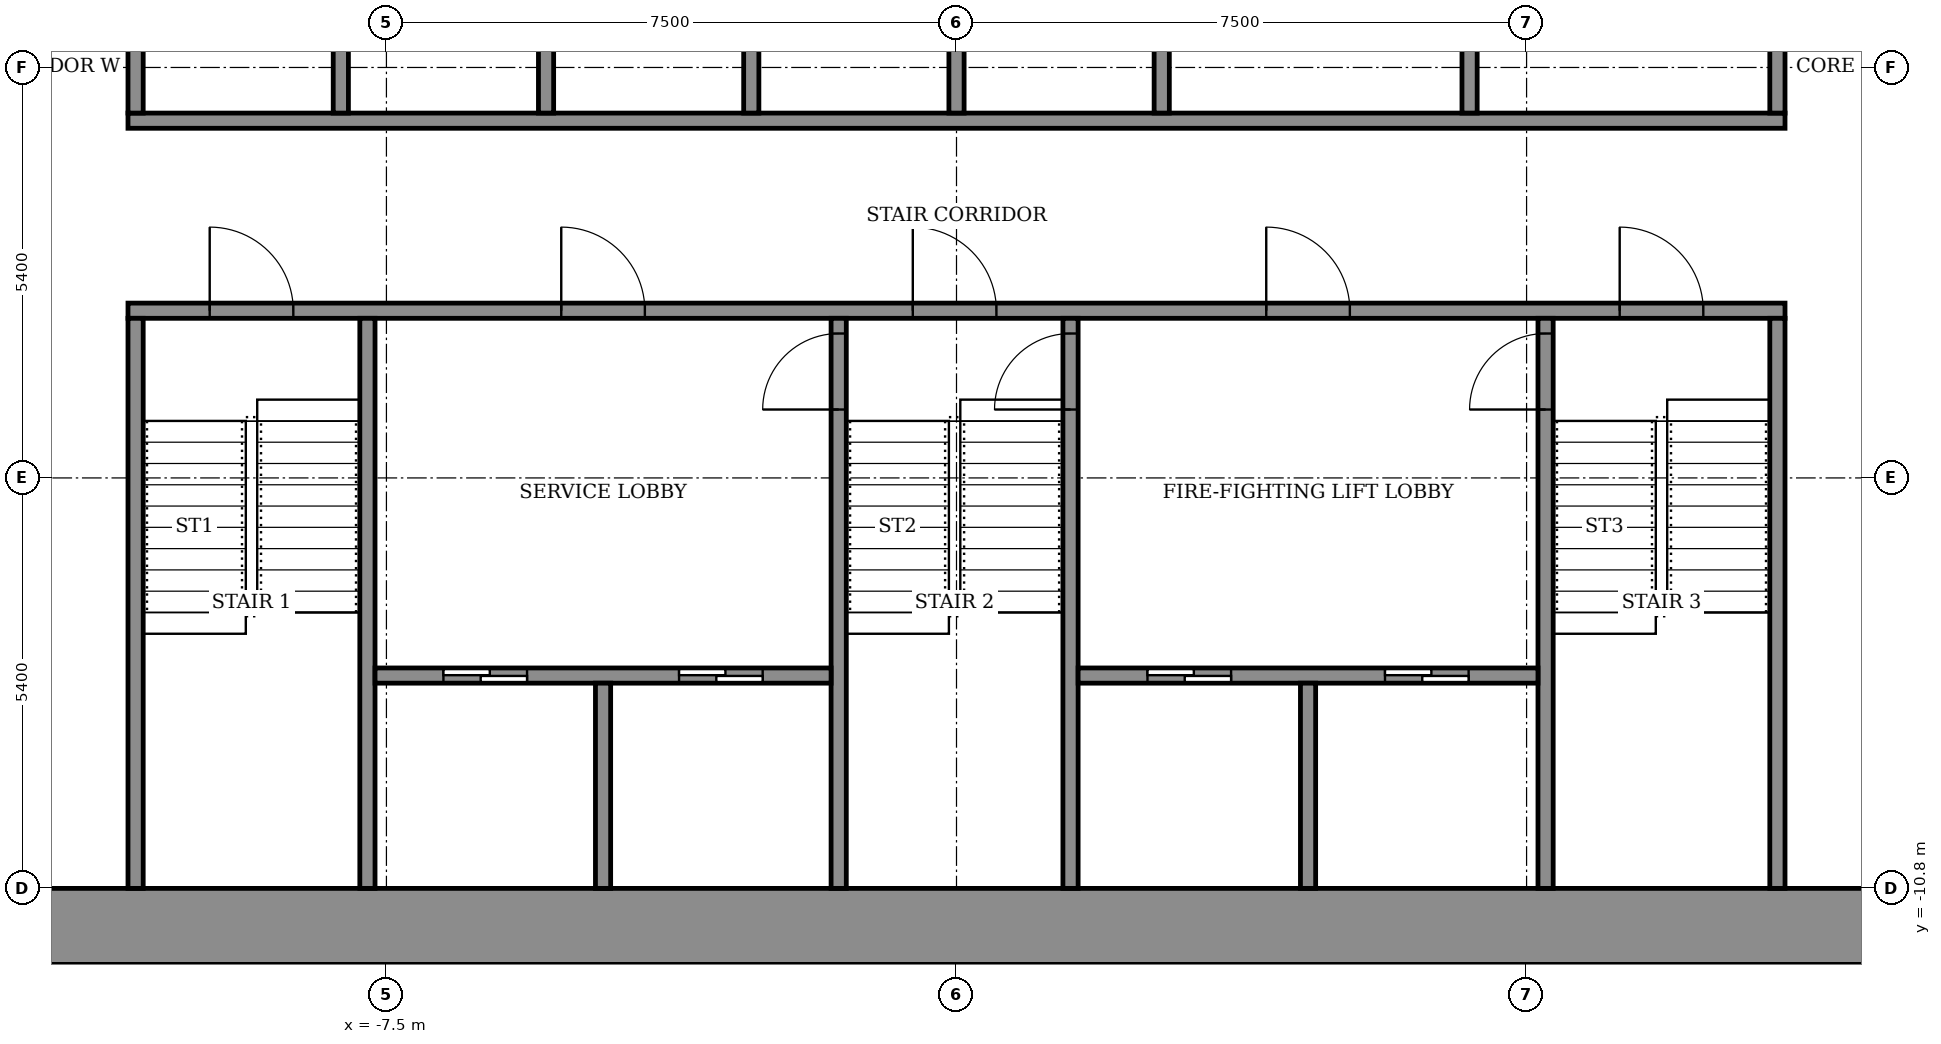
"""IFC4 building model, lengths in metres.
Left out: names, types, materials, properties, quantities, classifications, styles, units other than length and angle.
Written with IfcOpenShell. Run it as: python <this file> out.ifc"""

import sys

from ifc_helpers import new_model, si_unit, direction, frame, frame_2d, origin, place, context, subcontext, project, spatial, rectangle, extrude, element, fill, save


model = new_model("IFC4")
c1 = context("Model", 3, precision=1e-05, world=origin(), true_north=direction((0.0, 1.0)))
c2 = subcontext(c1, "Body", "Model", "MODEL_VIEW")
j1 = project(units=[si_unit("LENGTHUNIT", "METRE"), si_unit("PLANEANGLEUNIT", "RADIAN")], contexts=[c1])
p1 = place(None, origin())
s1 = spatial("IfcSite", under=j1, at=p1, CompositionType="ELEMENT")
p2 = place(p1, origin())
s2 = spatial("IfcBuilding", under=s1, at=p2, CompositionType="ELEMENT")
p3 = place(p2, frame((0.0, 0.0, 90.1)))
s3 = spatial("IfcBuildingStorey", under=s2, at=p3, CompositionType="ELEMENT", Elevation=90.1)
p4 = place(p3, frame((-14.8, -11.3, 0.0), z_axis=(0.0, 0.0, 1.0), x_axis=(1.0, 0.0, 0.0)))
e1 = element("IfcWall", 1, at=p4, inside=s3, PredefinedType="SHEAR", context=c2, shape_type="SweptSolid", body=[
    extrude(rectangle(XDim=29.6, YDim=1.0, at=frame_2d((14.8, 0.0))), origin(), (0.0, 0.0, 1.0), 3.6),
])
p5 = place(p3, frame((-10.9, -3.2, 0.0), z_axis=(0.0, 0.0, 1.0), x_axis=(1.0, 0.0, 0.0)))
e2 = element("IfcWall", 2, at=p5, inside=s3, PredefinedType="SHEAR", context=c2, shape_type="SweptSolid", body=[
    extrude(rectangle(XDim=21.8, YDim=0.2, at=frame_2d((10.9, 0.0))), origin(), (0.0, 0.0, 1.0), 3.05),
])
p6 = place(p5, frame((1.075, 0.0, 0.0)))
e3 = element("IfcOpeningElement", 3, at=p6, cuts=e2, PredefinedType="OPENING", context=c2, shape_type="SweptSolid", body=[
    extrude(rectangle(XDim=1.1, YDim=2.1, at=frame_2d((0.55, 1.05))), frame((0.0, 0.11, 0.0), z_axis=(0.0, -1.0, 0.0), x_axis=(1.0, 0.0, 0.0)), (0.0, 0.0, 1.0), 0.22),
])
p7 = place(p5, frame((10.325, 0.0, 0.0)))
e4 = element("IfcOpeningElement", 4, at=p7, cuts=e2, PredefinedType="OPENING", context=c2, shape_type="SweptSolid", body=[
    extrude(rectangle(XDim=1.1, YDim=2.1, at=frame_2d((0.55, 1.05))), frame((0.0, 0.11, 0.0), z_axis=(0.0, -1.0, 0.0), x_axis=(1.0, 0.0, 0.0)), (0.0, 0.0, 1.0), 0.22),
])
p8 = place(p5, frame((19.625, 0.0, 0.0)))
e5 = element("IfcOpeningElement", 5, at=p8, cuts=e2, PredefinedType="OPENING", context=c2, shape_type="SweptSolid", body=[
    extrude(rectangle(XDim=1.1, YDim=2.1, at=frame_2d((0.55, 1.05))), frame((0.0, 0.11, 0.0), z_axis=(0.0, -1.0, 0.0), x_axis=(1.0, 0.0, 0.0)), (0.0, 0.0, 1.0), 0.22),
])
p9 = place(p5, frame((5.7, 0.0, 0.0)))
e6 = element("IfcOpeningElement", 6, at=p9, cuts=e2, PredefinedType="OPENING", context=c2, shape_type="SweptSolid", body=[
    extrude(rectangle(XDim=1.1, YDim=2.1, at=frame_2d((0.55, 1.05))), frame((0.0, 0.11, 0.0), z_axis=(0.0, -1.0, 0.0), x_axis=(1.0, 0.0, 0.0)), (0.0, 0.0, 1.0), 0.22),
])
p10 = place(p5, frame((14.975, 0.0, 0.0)))
e7 = element("IfcOpeningElement", 7, at=p10, cuts=e2, PredefinedType="OPENING", context=c2, shape_type="SweptSolid", body=[
    extrude(rectangle(XDim=1.1, YDim=2.1, at=frame_2d((0.55, 1.05))), frame((0.0, 0.11, 0.0), z_axis=(0.0, -1.0, 0.0), x_axis=(1.0, 0.0, 0.0)), (0.0, 0.0, 1.0), 0.22),
])
p11 = place(p3, frame((-10.9, -0.7, 0.0), z_axis=(0.0, 0.0, 1.0), x_axis=(1.0, 0.0, 0.0)))
e8 = element("IfcWall", 8, at=p11, inside=s3, PredefinedType="SHEAR", context=c2, shape_type="SweptSolid", body=[
    extrude(rectangle(XDim=21.8, YDim=0.2, at=frame_2d((10.9, 0.0))), origin(), (0.0, 0.0, 1.0), 3.05),
])
for number, where, z_axis, x_axis in (
    (9, (-10.8, -10.8, 0.0), (0.0, 0.0, 1.0), (0.0, 1.0, 0.0)),
    (10, (-7.75, -10.8, 0.0), (0.0, 0.0, 1.0), (0.0, 1.0, 0.0)),
):
    element("IfcWall", number, at=place(p3, frame(where, z_axis=z_axis, x_axis=x_axis)), inside=s3, PredefinedType="SHEAR", context=c2, shape_type="SweptSolid", body=[
        extrude(rectangle(XDim=7.5, YDim=0.2, at=frame_2d((3.75, 0.0))), origin(), (0.0, 0.0, 1.0), 3.05),
    ])
p12 = place(p3, frame((-1.55, -10.8, 0.0), z_axis=(0.0, 0.0, 1.0), x_axis=(0.0, 1.0, 0.0)))
e11 = element("IfcWall", 11, at=p12, inside=s3, PredefinedType="SHEAR", context=c2, shape_type="SweptSolid", body=[
    extrude(rectangle(XDim=7.5, YDim=0.2, at=frame_2d((3.75, 0.0))), origin(), (0.0, 0.0, 1.0), 3.05),
])
p13 = place(p12, frame((6.3, 0.0, 0.0)))
e12 = element("IfcOpeningElement", 12, at=p13, cuts=e11, PredefinedType="OPENING", context=c2, shape_type="SweptSolid", body=[
    extrude(rectangle(XDim=1.0, YDim=2.1, at=frame_2d((0.5, 1.05))), frame((0.0, 0.11, 0.0), z_axis=(0.0, -1.0, 0.0), x_axis=(1.0, 0.0, 0.0)), (0.0, 0.0, 1.0), 0.22),
])
p14 = place(p3, frame((1.5, -10.8, 0.0), z_axis=(0.0, 0.0, 1.0), x_axis=(0.0, 1.0, 0.0)))
e13 = element("IfcWall", 13, at=p14, inside=s3, PredefinedType="SHEAR", context=c2, shape_type="SweptSolid", body=[
    extrude(rectangle(XDim=7.5, YDim=0.2, at=frame_2d((3.75, 0.0))), origin(), (0.0, 0.0, 1.0), 3.05),
])
p15 = place(p14, frame((6.3, 0.0, 0.0)))
e14 = element("IfcOpeningElement", 14, at=p15, cuts=e13, PredefinedType="OPENING", context=c2, shape_type="SweptSolid", body=[
    extrude(rectangle(XDim=1.0, YDim=2.1, at=frame_2d((0.5, 1.05))), frame((0.0, 0.11, 0.0), z_axis=(0.0, -1.0, 0.0), x_axis=(1.0, 0.0, 0.0)), (0.0, 0.0, 1.0), 0.22),
])
p16 = place(p3, frame((7.75, -10.8, 0.0), z_axis=(0.0, 0.0, 1.0), x_axis=(0.0, 1.0, 0.0)))
e15 = element("IfcWall", 15, at=p16, inside=s3, PredefinedType="SHEAR", context=c2, shape_type="SweptSolid", body=[
    extrude(rectangle(XDim=7.5, YDim=0.2, at=frame_2d((3.75, 0.0))), origin(), (0.0, 0.0, 1.0), 3.05),
])
p17 = place(p16, frame((6.3, 0.0, 0.0)))
e16 = element("IfcOpeningElement", 16, at=p17, cuts=e15, PredefinedType="OPENING", context=c2, shape_type="SweptSolid", body=[
    extrude(rectangle(XDim=1.0, YDim=2.1, at=frame_2d((0.5, 1.05))), frame((0.0, 0.11, 0.0), z_axis=(0.0, -1.0, 0.0), x_axis=(1.0, 0.0, 0.0)), (0.0, 0.0, 1.0), 0.22),
])
p18 = place(p3, frame((10.8, -10.8, 0.0), z_axis=(0.0, 0.0, 1.0), x_axis=(0.0, 1.0, 0.0)))
e17 = element("IfcWall", 17, at=p18, inside=s3, PredefinedType="SHEAR", context=c2, shape_type="SweptSolid", body=[
    extrude(rectangle(XDim=7.5, YDim=0.2, at=frame_2d((3.75, 0.0))), origin(), (0.0, 0.0, 1.0), 3.05),
])
p19 = place(p3, frame((-7.65, -8.0, 0.0), z_axis=(0.0, 0.0, 1.0), x_axis=(1.0, 0.0, 0.0)))
e18 = element("IfcWall", 18, at=p19, inside=s3, PredefinedType="SHEAR", context=c2, shape_type="SweptSolid", body=[
    extrude(rectangle(XDim=6.0, YDim=0.2, at=frame_2d((3.0, 0.0))), origin(), (0.0, 0.0, 1.0), 3.05),
])
p20 = place(p19, frame((0.9, 0.0, 0.0)))
e19 = element("IfcOpeningElement", 19, at=p20, cuts=e18, PredefinedType="OPENING", context=c2, shape_type="SweptSolid", body=[
    extrude(rectangle(XDim=1.1, YDim=2.1, at=frame_2d((0.55, 1.05))), frame((0.0, 0.11, 0.0), z_axis=(0.0, -1.0, 0.0), x_axis=(1.0, 0.0, 0.0)), (0.0, 0.0, 1.0), 0.22),
])
p21 = place(p19, frame((4.0, 0.0, 0.0)))
e20 = element("IfcOpeningElement", 20, at=p21, cuts=e18, PredefinedType="OPENING", context=c2, shape_type="SweptSolid", body=[
    extrude(rectangle(XDim=1.1, YDim=2.1, at=frame_2d((0.55, 1.05))), frame((0.0, 0.11, 0.0), z_axis=(0.0, -1.0, 0.0), x_axis=(1.0, 0.0, 0.0)), (0.0, 0.0, 1.0), 0.22),
])
p22 = place(p3, frame((-4.65, -10.8, 0.0), z_axis=(0.0, 0.0, 1.0), x_axis=(0.0, 1.0, 0.0)))
e21 = element("IfcWall", 21, at=p22, inside=s3, PredefinedType="SHEAR", context=c2, shape_type="SweptSolid", body=[
    extrude(rectangle(XDim=2.7, YDim=0.2, at=frame_2d((1.35, 0.0))), origin(), (0.0, 0.0, 1.0), 3.05),
])
p23 = place(p3, frame((1.6, -8.0, 0.0), z_axis=(0.0, 0.0, 1.0), x_axis=(1.0, 0.0, 0.0)))
e22 = element("IfcWall", 22, at=p23, inside=s3, PredefinedType="SHEAR", context=c2, shape_type="SweptSolid", body=[
    extrude(rectangle(XDim=6.05, YDim=0.2, at=frame_2d((3.025, 0.0))), origin(), (0.0, 0.0, 1.0), 3.05),
])
p24 = place(p23, frame((0.913, 0.0, 0.0)))
e23 = element("IfcOpeningElement", 23, at=p24, cuts=e22, PredefinedType="OPENING", context=c2, shape_type="SweptSolid", body=[
    extrude(rectangle(XDim=1.1, YDim=2.1, at=frame_2d((0.55, 1.05))), frame((0.0, 0.11, 0.0), z_axis=(0.0, -1.0, 0.0), x_axis=(1.0, 0.0, 0.0)), (0.0, 0.0, 1.0), 0.22),
])
p25 = place(p23, frame((4.038, 0.0, 0.0)))
e24 = element("IfcOpeningElement", 24, at=p25, cuts=e22, PredefinedType="OPENING", context=c2, shape_type="SweptSolid", body=[
    extrude(rectangle(XDim=1.1, YDim=2.1, at=frame_2d((0.55, 1.05))), frame((0.0, 0.11, 0.0), z_axis=(0.0, -1.0, 0.0), x_axis=(1.0, 0.0, 0.0)), (0.0, 0.0, 1.0), 0.22),
])
p26 = place(p3, frame((4.625, -10.8, 0.0), z_axis=(0.0, 0.0, 1.0), x_axis=(0.0, 1.0, 0.0)))
e25 = element("IfcWall", 25, at=p26, inside=s3, PredefinedType="SHEAR", context=c2, shape_type="SweptSolid", body=[
    extrude(rectangle(XDim=2.7, YDim=0.2, at=frame_2d((1.35, 0.0))), origin(), (0.0, 0.0, 1.0), 3.05),
])
for number, where, z_axis, x_axis in (
    (26, (-10.8, -0.6, 0.0), (0.0, 0.0, 1.0), (0.0, 1.0, 0.0)),
    (27, (-8.1, -0.6, 0.0), (0.0, 0.0, 1.0), (0.0, 1.0, 0.0)),
    (28, (-5.4, -0.6, 0.0), (0.0, 0.0, 1.0), (0.0, 1.0, 0.0)),
    (29, (-2.7, -0.6, 0.0), (0.0, 0.0, 1.0), (0.0, 1.0, 0.0)),
    (30, (0.0, -0.6, 0.0), (0.0, 0.0, 1.0), (0.0, 1.0, 0.0)),
    (31, (2.7, -0.6, 0.0), (0.0, 0.0, 1.0), (0.0, 1.0, 0.0)),
):
    element("IfcWall", number, at=place(p3, frame(where, z_axis=z_axis, x_axis=x_axis)), inside=s3, PredefinedType="SHEAR", context=c2, shape_type="SweptSolid", body=[
        extrude(rectangle(XDim=2.5, YDim=0.2, at=frame_2d((1.25, 0.0))), origin(), (0.0, 0.0, 1.0), 3.05),
    ])
for number, where, z_axis, x_axis in (
    (32, (6.75, -0.6, 0.0), (0.0, 0.0, 1.0), (0.0, 1.0, 0.0)),
    (33, (10.8, -0.6, 0.0), (0.0, 0.0, 1.0), (0.0, 1.0, 0.0)),
):
    element("IfcWall", number, at=place(p3, frame(where, z_axis=z_axis, x_axis=x_axis)), inside=s3, PredefinedType="STANDARD", context=c2, shape_type="SweptSolid", body=[
        extrude(rectangle(XDim=2.5, YDim=0.2, at=frame_2d((1.25, 0.0))), origin(), (0.0, 0.0, 1.0), 3.05),
    ])
p27 = place(p24, origin())
e34 = element("IfcDoor", 34, at=p27, inside=s3, OperationType="SLIDING_TO_LEFT", PredefinedType="DOOR", context=c2, shape_type="SweptSolid", body=[
    extrude(rectangle(XDim=1.1, YDim=2.1, at=frame_2d((0.55, 1.05))), frame((0.0, 0.025, 0.0), z_axis=(0.0, -1.0, 0.0), x_axis=(1.0, 0.0, 0.0)), (0.0, 0.0, 1.0), 0.05),
])
fill(e23, e34)
p28 = place(p20, origin())
e35 = element("IfcDoor", 35, at=p28, inside=s3, OperationType="SLIDING_TO_LEFT", PredefinedType="DOOR", context=c2, shape_type="SweptSolid", body=[
    extrude(rectangle(XDim=1.1, YDim=2.1, at=frame_2d((0.55, 1.05))), frame((0.0, 0.025, 0.0), z_axis=(0.0, -1.0, 0.0), x_axis=(1.0, 0.0, 0.0)), (0.0, 0.0, 1.0), 0.05),
])
fill(e19, e35)
p29 = place(p25, origin())
e36 = element("IfcDoor", 36, at=p29, inside=s3, OperationType="SLIDING_TO_LEFT", PredefinedType="DOOR", context=c2, shape_type="SweptSolid", body=[
    extrude(rectangle(XDim=1.1, YDim=2.1, at=frame_2d((0.55, 1.05))), frame((0.0, 0.025, 0.0), z_axis=(0.0, -1.0, 0.0), x_axis=(1.0, 0.0, 0.0)), (0.0, 0.0, 1.0), 0.05),
])
fill(e24, e36)
p30 = place(p21, origin())
e37 = element("IfcDoor", 37, at=p30, inside=s3, OperationType="SLIDING_TO_LEFT", PredefinedType="DOOR", context=c2, shape_type="SweptSolid", body=[
    extrude(rectangle(XDim=1.1, YDim=2.1, at=frame_2d((0.55, 1.05))), frame((0.0, 0.025, 0.0), z_axis=(0.0, -1.0, 0.0), x_axis=(1.0, 0.0, 0.0)), (0.0, 0.0, 1.0), 0.05),
])
fill(e20, e37)
p31 = place(p6, origin())
e38 = element("IfcDoor", 38, at=p31, inside=s3, OperationType="SINGLE_SWING_RIGHT", PredefinedType="DOOR", context=c2, shape_type="SweptSolid", body=[
    extrude(rectangle(XDim=1.1, YDim=2.1, at=frame_2d((0.55, 1.05))), frame((0.0, 0.025, 0.0), z_axis=(0.0, -1.0, 0.0), x_axis=(1.0, 0.0, 0.0)), (0.0, 0.0, 1.0), 0.05),
])
fill(e3, e38)
p32 = place(p7, origin())
e39 = element("IfcDoor", 39, at=p32, inside=s3, OperationType="SINGLE_SWING_RIGHT", PredefinedType="DOOR", context=c2, shape_type="SweptSolid", body=[
    extrude(rectangle(XDim=1.1, YDim=2.1, at=frame_2d((0.55, 1.05))), frame((0.0, 0.025, 0.0), z_axis=(0.0, -1.0, 0.0), x_axis=(1.0, 0.0, 0.0)), (0.0, 0.0, 1.0), 0.05),
])
fill(e4, e39)
p33 = place(p8, origin())
e40 = element("IfcDoor", 40, at=p33, inside=s3, OperationType="SINGLE_SWING_RIGHT", PredefinedType="DOOR", context=c2, shape_type="SweptSolid", body=[
    extrude(rectangle(XDim=1.1, YDim=2.1, at=frame_2d((0.55, 1.05))), frame((0.0, 0.025, 0.0), z_axis=(0.0, -1.0, 0.0), x_axis=(1.0, 0.0, 0.0)), (0.0, 0.0, 1.0), 0.05),
])
fill(e5, e40)
p34 = place(p9, origin())
e41 = element("IfcDoor", 41, at=p34, inside=s3, OperationType="SINGLE_SWING_LEFT", PredefinedType="DOOR", context=c2, shape_type="SweptSolid", body=[
    extrude(rectangle(XDim=1.1, YDim=2.1, at=frame_2d((0.55, 1.05))), frame((0.0, 0.025, 0.0), z_axis=(0.0, -1.0, 0.0), x_axis=(1.0, 0.0, 0.0)), (0.0, 0.0, 1.0), 0.05),
])
fill(e6, e41)
p35 = place(p10, origin())
e42 = element("IfcDoor", 42, at=p35, inside=s3, OperationType="SINGLE_SWING_LEFT", PredefinedType="DOOR", context=c2, shape_type="SweptSolid", body=[
    extrude(rectangle(XDim=1.1, YDim=2.1, at=frame_2d((0.55, 1.05))), frame((0.0, 0.025, 0.0), z_axis=(0.0, -1.0, 0.0), x_axis=(1.0, 0.0, 0.0)), (0.0, 0.0, 1.0), 0.05),
])
fill(e7, e42)
p36 = place(p13, origin())
e43 = element("IfcDoor", 43, at=p36, inside=s3, OperationType="SINGLE_SWING_RIGHT", PredefinedType="DOOR", context=c2, shape_type="SweptSolid", body=[
    extrude(rectangle(XDim=1.0, YDim=2.1, at=frame_2d((0.5, 1.05))), frame((0.0, 0.025, 0.0), z_axis=(0.0, -1.0, 0.0), x_axis=(1.0, 0.0, 0.0)), (0.0, 0.0, 1.0), 0.05),
])
fill(e12, e43)
p37 = place(p15, origin())
e44 = element("IfcDoor", 44, at=p37, inside=s3, OperationType="SINGLE_SWING_RIGHT", PredefinedType="DOOR", context=c2, shape_type="SweptSolid", body=[
    extrude(rectangle(XDim=1.0, YDim=2.1, at=frame_2d((0.5, 1.05))), frame((0.0, 0.025, 0.0), z_axis=(0.0, -1.0, 0.0), x_axis=(1.0, 0.0, 0.0)), (0.0, 0.0, 1.0), 0.05),
])
fill(e14, e44)
p38 = place(p17, origin())
e45 = element("IfcDoor", 45, at=p38, inside=s3, OperationType="SINGLE_SWING_RIGHT", PredefinedType="DOOR", context=c2, shape_type="SweptSolid", body=[
    extrude(rectangle(XDim=1.0, YDim=2.1, at=frame_2d((0.5, 1.05))), frame((0.0, 0.025, 0.0), z_axis=(0.0, -1.0, 0.0), x_axis=(1.0, 0.0, 0.0)), (0.0, 0.0, 1.0), 0.05),
])
fill(e16, e45)
save(model, sys.argv[1])
